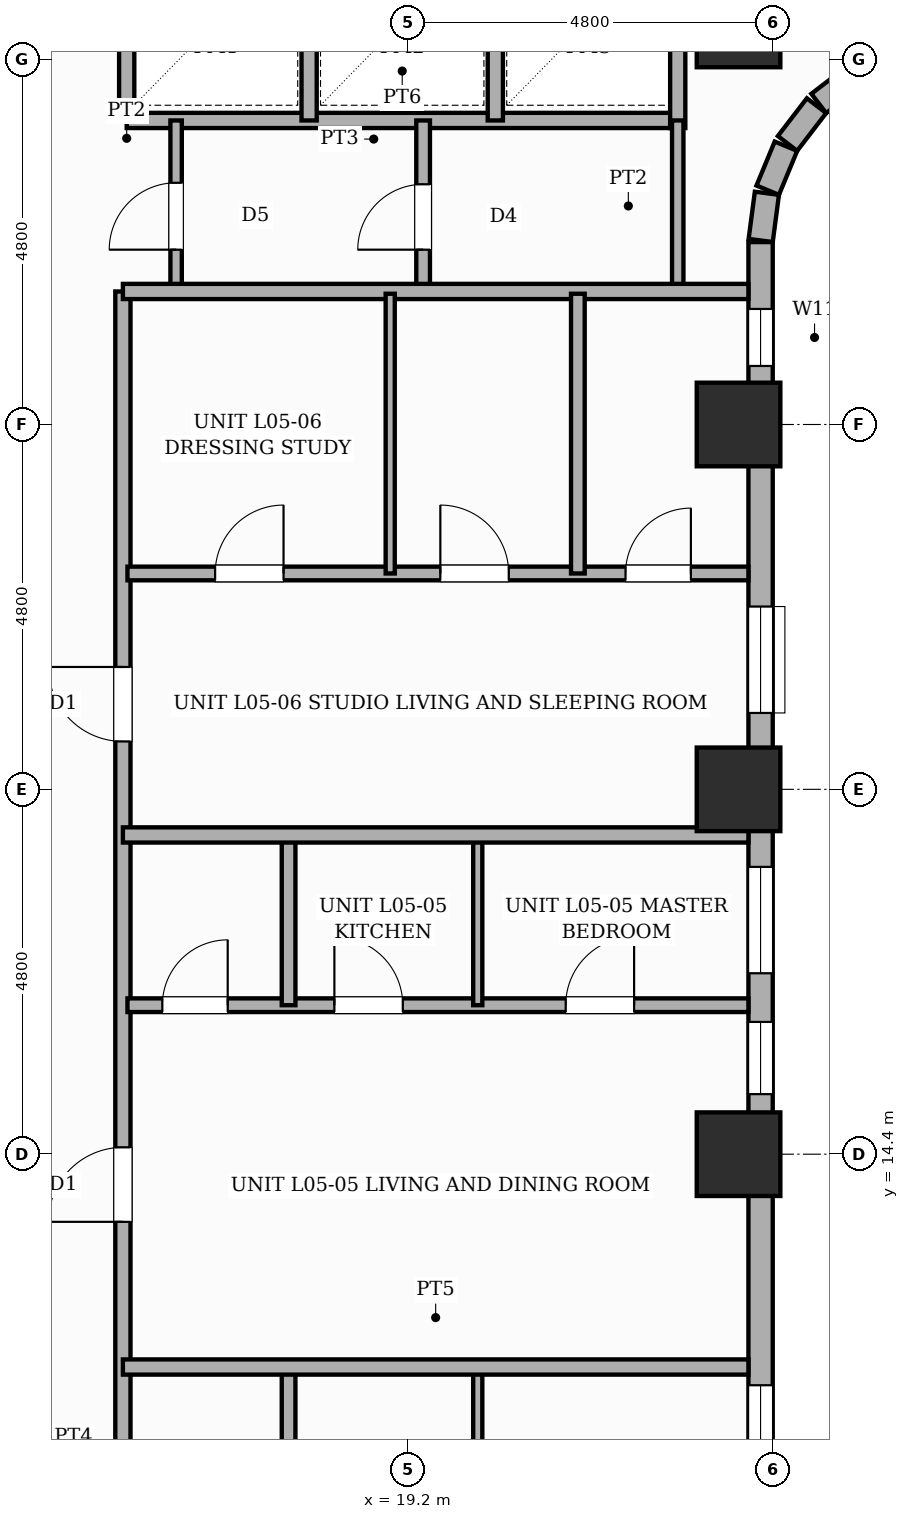
"""IFC4 building model, lengths in metres.
Left out: names, types, materials, properties, quantities, classifications, styles, units other than length and angle.
Written with IfcOpenShell. Run it as: python <this file> out.ifc"""

import sys

from ifc_helpers import new_model, si_unit, direction, frame, frame_2d, origin, origin_2d, place, context, subcontext, project, spatial, rectangle, extrude, element, fill, save


model = new_model("IFC4")
c1 = context("Model", 3, precision=1e-05, world=origin(), true_north=direction((0.0, 1.0)))
c2 = subcontext(c1, "Body", "Model", "MODEL_VIEW")
j1 = project(units=[si_unit("LENGTHUNIT", "METRE"), si_unit("PLANEANGLEUNIT", "RADIAN")], contexts=[c1])
p1 = place(None, origin())
s1 = spatial("IfcSite", under=j1, at=p1, CompositionType="ELEMENT")
p2 = place(p1, origin())
s2 = spatial("IfcBuilding", under=s1, at=p2, CompositionType="ELEMENT")
p3 = place(p2, frame((0.0, 0.0, 25.0)))
s3 = spatial("IfcBuildingStorey", under=s2, at=p3, CompositionType="ELEMENT", Elevation=25.0)
for number, where, z_axis, x_axis in (
    (1, (23.55, 14.4, 0.0), (0.0, 0.0, 1.0), (1.0, 0.0, 0.0)),
    (2, (23.55, 19.2, 0.0), (0.0, 0.0, 1.0), (1.0, 0.0, 0.0)),
    (3, (23.55, 24.0, 0.0), (0.0, 0.0, 1.0), (1.0, 0.0, 0.0)),
    (4, (23.55, 29.25, 0.0), (0.0, 0.0, 1.0), (1.0, 0.0, 0.0)),
):
    element("IfcColumn", number, at=place(p3, frame(where, z_axis=z_axis, x_axis=x_axis)), inside=s3, PredefinedType="COLUMN", context=c2, shape_type="SweptSolid", body=[
        extrude(rectangle(XDim=1.1, YDim=1.1, at=origin_2d()), origin(), (0.0, 0.0, 1.0), 3.6),
    ])
for number, where, z_axis, x_axis in (
    (5, (25.103, 28.605, 0.0), (0.0, 0.0, 1.0), (-0.793, -0.609, 0.0)),
    (6, (24.576, 28.195, 0.0), (0.0, 0.0, 1.0), (-0.609, -0.793, 0.0)),
):
    element("IfcWall", number, at=place(p3, frame(where, z_axis=z_axis, x_axis=x_axis)), inside=s3, PredefinedType="STANDARD", context=c2, shape_type="SweptSolid", body=[
        extrude(rectangle(XDim=0.626, YDim=0.32, at=frame_2d((0.313, 0.0))), origin(), (0.0, 0.0, 1.0), 3.35),
    ])
p4 = place(p3, frame((24.174, 27.661, 0.0), z_axis=(0.0, 0.0, 1.0), x_axis=(-0.382455093999, -0.923974080304, 0.0)))
e7 = element("IfcWall", 7, at=p4, inside=s3, PredefinedType="STANDARD", context=c2, shape_type="SweptSolid", body=[
    extrude(rectangle(XDim=0.626, YDim=0.32, at=frame_2d((0.313, 0.0))), origin(), (0.0, 0.0, 1.0), 3.35),
])
p5 = place(p3, frame((23.923, 27.042, 0.0), z_axis=(0.0, 0.0, 1.0), x_axis=(-0.130555323746, -0.9914410257, 0.0)))
e8 = element("IfcWall", 8, at=p5, inside=s3, PredefinedType="STANDARD", context=c2, shape_type="SweptSolid", body=[
    extrude(rectangle(XDim=0.626, YDim=0.32, at=frame_2d((0.313, 0.0))), origin(), (0.0, 0.0, 1.0), 2.53),
])
p6 = place(p3, frame((23.84, 26.4, 0.0), z_axis=(0.0, 0.0, 1.0), x_axis=(0.0, -1.0, 0.0)))
e9 = element("IfcWall", 9, at=p6, inside=s3, PredefinedType="STANDARD", context=c2, shape_type="SweptSolid", body=[
    extrude(rectangle(XDim=19.2, YDim=0.32, at=frame_2d((9.6, 0.0))), origin(), (0.0, 0.0, 1.0), 2.53),
])
p7 = place(p6, frame((15.04, 0.0, 0.45)))
e10 = element("IfcOpeningElement", 10, at=p7, cuts=e9, PredefinedType="OPENING", context=c2, shape_type="SweptSolid", body=[
    extrude(rectangle(XDim=0.95, YDim=1.8, at=frame_2d((0.475, 0.9))), frame((0.0, 0.17, 0.0), z_axis=(0.0, -1.0, 0.0), x_axis=(1.0, 0.0, 0.0)), (0.0, 0.0, 1.0), 0.34),
])
p8 = place(p6, frame((8.22, 0.0, 0.65)))
e11 = element("IfcOpeningElement", 11, at=p8, cuts=e9, PredefinedType="OPENING", context=c2, shape_type="SweptSolid", body=[
    extrude(rectangle(XDim=1.4, YDim=1.1, at=frame_2d((0.7, 0.55))), frame((0.0, 0.17, 0.0), z_axis=(0.0, -1.0, 0.0), x_axis=(1.0, 0.0, 0.0)), (0.0, 0.0, 1.0), 0.34),
])
p9 = place(p6, frame((4.795, 0.0, 0.65)))
e12 = element("IfcOpeningElement", 12, at=p9, cuts=e9, PredefinedType="OPENING", context=c2, shape_type="SweptSolid", body=[
    extrude(rectangle(XDim=1.4, YDim=1.1, at=frame_2d((0.7, 0.55))), frame((0.0, 0.17, 0.0), z_axis=(0.0, -1.0, 0.0), x_axis=(1.0, 0.0, 0.0)), (0.0, 0.0, 1.0), 0.34),
])
p10 = place(p6, frame((10.26, 0.0, 0.45)))
e13 = element("IfcOpeningElement", 13, at=p10, cuts=e9, PredefinedType="OPENING", context=c2, shape_type="SweptSolid", body=[
    extrude(rectangle(XDim=0.95, YDim=1.8, at=frame_2d((0.475, 0.9))), frame((0.0, 0.17, 0.0), z_axis=(0.0, -1.0, 0.0), x_axis=(1.0, 0.0, 0.0)), (0.0, 0.0, 1.0), 0.34),
])
p11 = place(p6, frame((0.88, 0.0, 0.45)))
e14 = element("IfcOpeningElement", 14, at=p11, cuts=e9, PredefinedType="OPENING", context=c2, shape_type="SweptSolid", body=[
    extrude(rectangle(XDim=0.75, YDim=1.8, at=frame_2d((0.375, 0.9))), frame((0.0, 0.17, 0.0), z_axis=(0.0, -1.0, 0.0), x_axis=(1.0, 0.0, 0.0)), (0.0, 0.0, 1.0), 0.34),
])
p12 = place(p3, frame((15.5, 28.0, 0.0), z_axis=(0.0, 0.0, 1.0), x_axis=(1.0, 0.0, 0.0)))
e15 = element("IfcWall", 15, at=p12, inside=s3, PredefinedType="POLYGONAL", context=c2, shape_type="SweptSolid", body=[
    extrude(rectangle(XDim=7.25, YDim=0.2, at=frame_2d((3.625, 0.0))), origin(), (0.0, 0.0, 1.0), 3.35),
])
p13 = place(p3, frame((22.75, 27.9, 0.0), z_axis=(0.0, 0.0, 1.0), x_axis=(0.0, 1.0, 0.0)))
e16 = element("IfcWall", 16, at=p13, inside=s3, PredefinedType="POLYGONAL", context=c2, shape_type="SweptSolid", body=[
    extrude(rectangle(XDim=3.0, YDim=0.2, at=frame_2d((1.5, 0.0))), origin(), (0.0, 0.0, 1.0), 3.35),
])
for number, where, z_axis, x_axis in (
    (17, (15.5, 28.0, 0.0), (0.0, 0.0, 1.0), (0.0, 1.0, 0.0)),
    (18, (17.9, 28.0, 0.0), (0.0, 0.0, 1.0), (0.0, 1.0, 0.0)),
    (19, (20.35, 28.0, 0.0), (0.0, 0.0, 1.0), (0.0, 1.0, 0.0)),
):
    element("IfcWall", number, at=place(p3, frame(where, z_axis=z_axis, x_axis=x_axis)), inside=s3, PredefinedType="POLYGONAL", context=c2, shape_type="SweptSolid", body=[
        extrude(rectangle(XDim=2.9, YDim=0.2, at=frame_2d((1.45, 0.0))), origin(), (0.0, 0.0, 1.0), 3.35),
    ])
p14 = place(p3, frame((16.15, 25.75, 0.0), z_axis=(0.0, 0.0, 1.0), x_axis=(0.0, 1.0, 0.0)))
e20 = element("IfcWall", 20, at=p14, inside=s3, PredefinedType="PARTITIONING", context=c2, shape_type="SweptSolid", body=[
    extrude(rectangle(XDim=2.25, YDim=0.15, at=frame_2d((1.125, 0.0))), origin(), (0.0, 0.0, 1.0), 3.35),
])
p15 = place(p14, frame((0.55, 0.0, 0.0)))
e21 = element("IfcOpeningElement", 21, at=p15, cuts=e20, PredefinedType="OPENING", context=c2, shape_type="SweptSolid", body=[
    extrude(rectangle(XDim=0.88, YDim=2.1, at=frame_2d((0.44, 1.05))), frame((0.0, 0.085, 0.0), z_axis=(0.0, -1.0, 0.0), x_axis=(1.0, 0.0, 0.0)), (0.0, 0.0, 1.0), 0.17),
])
p16 = place(p3, frame((22.75, 25.75, 0.0), z_axis=(0.0, 0.0, 1.0), x_axis=(0.0, 1.0, 0.0)))
e22 = element("IfcWall", 22, at=p16, inside=s3, PredefinedType="PARTITIONING", context=c2, shape_type="SweptSolid", body=[
    extrude(rectangle(XDim=2.25, YDim=0.15, at=frame_2d((1.125, 0.0))), origin(), (0.0, 0.0, 1.0), 3.35),
])
p17 = place(p3, frame((19.4, 25.75, 0.0), z_axis=(0.0, 0.0, 1.0), x_axis=(0.0, 1.0, 0.0)))
e23 = element("IfcWall", 23, at=p17, inside=s3, PredefinedType="PLUMBINGWALL", context=c2, shape_type="SweptSolid", body=[
    extrude(rectangle(XDim=2.25, YDim=0.18, at=frame_2d((1.125, 0.0))), origin(), (0.0, 0.0, 1.0), 3.35),
])
p18 = place(p17, frame((0.55, 0.0, 0.0)))
e24 = element("IfcOpeningElement", 24, at=p18, cuts=e23, PredefinedType="OPENING", context=c2, shape_type="SweptSolid", body=[
    extrude(rectangle(XDim=0.86, YDim=2.1, at=frame_2d((0.43, 1.05))), frame((0.0, 0.1, 0.0), z_axis=(0.0, -1.0, 0.0), x_axis=(1.0, 0.0, 0.0)), (0.0, 0.0, 1.0), 0.2),
])
p19 = place(p3, frame((15.45, 5.12, 0.0), z_axis=(0.0, 0.0, 1.0), x_axis=(0.0, 1.0, 0.0)))
e25 = element("IfcWall", 25, at=p19, inside=s3, PredefinedType="PARTITIONING", context=c2, shape_type="SweptSolid", body=[
    extrude(rectangle(XDim=20.63, YDim=0.2, at=frame_2d((10.315, 0.0))), origin(), (0.0, 0.0, 1.0), 3.35),
])
p20 = place(p19, frame((1.025, 0.0, 0.0)))
e26 = element("IfcOpeningElement", 26, at=p20, cuts=e25, PredefinedType="OPENING", context=c2, shape_type="SweptSolid", body=[
    extrude(rectangle(XDim=0.98, YDim=2.18, at=frame_2d((0.49, 1.09))), frame((0.0, 0.11, 0.0), z_axis=(0.0, -1.0, 0.0), x_axis=(1.0, 0.0, 0.0)), (0.0, 0.0, 1.0), 0.22),
])
p21 = place(p19, frame((8.39, 0.0, 0.0)))
e27 = element("IfcOpeningElement", 27, at=p21, cuts=e25, PredefinedType="OPENING", context=c2, shape_type="SweptSolid", body=[
    extrude(rectangle(XDim=0.98, YDim=2.18, at=frame_2d((0.49, 1.09))), frame((0.0, 0.11, 0.0), z_axis=(0.0, -1.0, 0.0), x_axis=(1.0, 0.0, 0.0)), (0.0, 0.0, 1.0), 0.22),
])
p22 = place(p19, frame((14.71, 0.0, 0.0)))
e28 = element("IfcOpeningElement", 28, at=p22, cuts=e25, PredefinedType="OPENING", context=c2, shape_type="SweptSolid", body=[
    extrude(rectangle(XDim=0.98, YDim=2.18, at=frame_2d((0.49, 1.09))), frame((0.0, 0.11, 0.0), z_axis=(0.0, -1.0, 0.0), x_axis=(1.0, 0.0, 0.0)), (0.0, 0.0, 1.0), 0.22),
])
p23 = place(p3, frame((15.45, 25.75, 0.0), z_axis=(0.0, 0.0, 1.0), x_axis=(1.0, 0.0, 0.0)))
e29 = element("IfcWall", 29, at=p23, inside=s3, PredefinedType="PARTITIONING", context=c2, shape_type="SweptSolid", body=[
    extrude(rectangle(XDim=8.23, YDim=0.2, at=frame_2d((4.115, 0.0))), origin(), (0.0, 0.0, 1.0), 3.35),
])
p24 = place(p3, frame((17.63, 7.59, 0.0), z_axis=(0.0, 0.0, 1.0), x_axis=(0.0, 1.0, 0.0)))
e30 = element("IfcWall", 30, at=p24, inside=s3, PredefinedType="PLUMBINGWALL", context=c2, shape_type="SweptSolid", body=[
    extrude(rectangle(XDim=4.05, YDim=0.18, at=frame_2d((2.025, 0.0))), origin(), (0.0, 0.0, 1.0), 3.35),
])
p25 = place(p3, frame((20.119, 7.59, 0.0), z_axis=(0.0, 0.0, 1.0), x_axis=(0.0, 1.0, 0.0)))
e31 = element("IfcWall", 31, at=p25, inside=s3, PredefinedType="PARTITIONING", context=c2, shape_type="SweptSolid", body=[
    extrude(rectangle(XDim=4.05, YDim=0.12, at=frame_2d((2.025, 0.0))), origin(), (0.0, 0.0, 1.0), 3.35),
])
p26 = place(p3, frame((15.45, 11.6, 0.0), z_axis=(0.0, 0.0, 1.0), x_axis=(1.0, 0.0, 0.0)))
e32 = element("IfcWall", 32, at=p26, inside=s3, PredefinedType="SOLIDWALL", context=c2, shape_type="SweptSolid", body=[
    extrude(rectangle(XDim=8.23, YDim=0.2, at=frame_2d((4.115, 0.0))), origin(), (0.0, 0.0, 1.0), 3.35),
])
p27 = place(p3, frame((15.51, 16.36, 0.0), z_axis=(0.0, 0.0, 1.0), x_axis=(1.0, 0.0, 0.0)))
e33 = element("IfcWall", 33, at=p27, inside=s3, PredefinedType="PLUMBINGWALL", context=c2, shape_type="SweptSolid", body=[
    extrude(rectangle(XDim=8.17, YDim=0.18, at=frame_2d((4.085, 0.0))), origin(), (0.0, 0.0, 1.0), 3.35),
])
p28 = place(p27, frame((0.459, 0.0, 0.0)))
e34 = element("IfcOpeningElement", 34, at=p28, cuts=e33, PredefinedType="OPENING", context=c2, shape_type="SweptSolid", body=[
    extrude(rectangle(XDim=0.86, YDim=2.1, at=frame_2d((0.43, 1.05))), frame((0.0, 0.1, 0.0), z_axis=(0.0, -1.0, 0.0), x_axis=(1.0, 0.0, 0.0)), (0.0, 0.0, 1.0), 0.2),
])
p29 = place(p27, frame((2.722, 0.0, 0.0)))
e35 = element("IfcOpeningElement", 35, at=p29, cuts=e33, PredefinedType="OPENING", context=c2, shape_type="SweptSolid", body=[
    extrude(rectangle(XDim=0.9, YDim=2.15, at=frame_2d((0.45, 1.075))), frame((0.0, 0.1, 0.0), z_axis=(0.0, -1.0, 0.0), x_axis=(1.0, 0.0, 0.0)), (0.0, 0.0, 1.0), 0.2),
])
p30 = place(p27, frame((5.766, 0.0, 0.0)))
e36 = element("IfcOpeningElement", 36, at=p30, cuts=e33, PredefinedType="OPENING", context=c2, shape_type="SweptSolid", body=[
    extrude(rectangle(XDim=0.9, YDim=2.15, at=frame_2d((0.45, 1.075))), frame((0.0, 0.1, 0.0), z_axis=(0.0, -1.0, 0.0), x_axis=(1.0, 0.0, 0.0)), (0.0, 0.0, 1.0), 0.2),
])
p31 = place(p3, frame((17.63, 16.36, 0.0), z_axis=(0.0, 0.0, 1.0), x_axis=(0.0, 1.0, 0.0)))
e37 = element("IfcWall", 37, at=p31, inside=s3, PredefinedType="PLUMBINGWALL", context=c2, shape_type="SweptSolid", body=[
    extrude(rectangle(XDim=2.28, YDim=0.18, at=frame_2d((1.14, 0.0))), origin(), (0.0, 0.0, 1.0), 3.35),
])
p32 = place(p3, frame((20.119, 16.36, 0.0), z_axis=(0.0, 0.0, 1.0), x_axis=(0.0, 1.0, 0.0)))
e38 = element("IfcWall", 38, at=p32, inside=s3, PredefinedType="PARTITIONING", context=c2, shape_type="SweptSolid", body=[
    extrude(rectangle(XDim=2.28, YDim=0.12, at=frame_2d((1.14, 0.0))), origin(), (0.0, 0.0, 1.0), 3.35),
])
p33 = place(p3, frame((15.45, 18.6, 0.0), z_axis=(0.0, 0.0, 1.0), x_axis=(1.0, 0.0, 0.0)))
e39 = element("IfcWall", 39, at=p33, inside=s3, PredefinedType="SOLIDWALL", context=c2, shape_type="SweptSolid", body=[
    extrude(rectangle(XDim=8.23, YDim=0.2, at=frame_2d((4.115, 0.0))), origin(), (0.0, 0.0, 1.0), 3.35),
])
p34 = place(p3, frame((15.51, 22.04, 0.0), z_axis=(0.0, 0.0, 1.0), x_axis=(1.0, 0.0, 0.0)))
e40 = element("IfcWall", 40, at=p34, inside=s3, PredefinedType="PLUMBINGWALL", context=c2, shape_type="SweptSolid", body=[
    extrude(rectangle(XDim=8.17, YDim=0.18, at=frame_2d((4.085, 0.0))), origin(), (0.0, 0.0, 1.0), 3.35),
])
p35 = place(p34, frame((1.154, 0.0, 0.0)))
e41 = element("IfcOpeningElement", 41, at=p35, cuts=e40, PredefinedType="OPENING", context=c2, shape_type="SweptSolid", body=[
    extrude(rectangle(XDim=0.9, YDim=2.15, at=frame_2d((0.45, 1.075))), frame((0.0, 0.1, 0.0), z_axis=(0.0, -1.0, 0.0), x_axis=(1.0, 0.0, 0.0)), (0.0, 0.0, 1.0), 0.2),
])
p36 = place(p34, frame((4.116, 0.0, 0.0)))
e42 = element("IfcOpeningElement", 42, at=p36, cuts=e40, PredefinedType="OPENING", context=c2, shape_type="SweptSolid", body=[
    extrude(rectangle(XDim=0.9, YDim=2.15, at=frame_2d((0.45, 1.075))), frame((0.0, 0.1, 0.0), z_axis=(0.0, -1.0, 0.0), x_axis=(1.0, 0.0, 0.0)), (0.0, 0.0, 1.0), 0.2),
])
p37 = place(p34, frame((6.553, 0.0, 0.0)))
e43 = element("IfcOpeningElement", 43, at=p37, cuts=e40, PredefinedType="OPENING", context=c2, shape_type="SweptSolid", body=[
    extrude(rectangle(XDim=0.86, YDim=2.1, at=frame_2d((0.43, 1.05))), frame((0.0, 0.1, 0.0), z_axis=(0.0, -1.0, 0.0), x_axis=(1.0, 0.0, 0.0)), (0.0, 0.0, 1.0), 0.2),
])
p38 = place(p3, frame((18.967, 22.04, 0.0), z_axis=(0.0, 0.0, 1.0), x_axis=(0.0, 1.0, 0.0)))
e44 = element("IfcWall", 44, at=p38, inside=s3, PredefinedType="PARTITIONING", context=c2, shape_type="SweptSolid", body=[
    extrude(rectangle(XDim=3.68, YDim=0.12, at=frame_2d((1.84, 0.0))), origin(), (0.0, 0.0, 1.0), 3.35),
])
p39 = place(p3, frame((21.436, 22.04, 0.0), z_axis=(0.0, 0.0, 1.0), x_axis=(0.0, 1.0, 0.0)))
e45 = element("IfcWall", 45, at=p39, inside=s3, PredefinedType="PLUMBINGWALL", context=c2, shape_type="SweptSolid", body=[
    extrude(rectangle(XDim=3.68, YDim=0.18, at=frame_2d((1.84, 0.0))), origin(), (0.0, 0.0, 1.0), 3.35),
])
p40 = place(p7, origin())
e46 = element("IfcWindow", 46, at=p40, inside=s3, PartitioningType="SINGLE_PANEL", PredefinedType="WINDOW", context=c2, shape_type="SweptSolid", body=[
    extrude(rectangle(XDim=0.95, YDim=1.8, at=frame_2d((0.475, 0.9))), frame((0.0, 0.03, 0.0), z_axis=(0.0, -1.0, 0.0), x_axis=(1.0, 0.0, 0.0)), (0.0, 0.0, 1.0), 0.06),
])
fill(e10, e46)
p41 = place(p8, origin())
e47 = element("IfcWindow", 47, at=p41, inside=s3, PartitioningType="SINGLE_PANEL", PredefinedType="WINDOW", context=c2, shape_type="SweptSolid", body=[
    extrude(rectangle(XDim=1.4, YDim=1.1, at=frame_2d((0.7, 0.55))), frame((0.0, 0.03, 0.0), z_axis=(0.0, -1.0, 0.0), x_axis=(1.0, 0.0, 0.0)), (0.0, 0.0, 1.0), 0.06),
])
fill(e11, e47)
p42 = place(p9, origin())
e48 = element("IfcWindow", 48, at=p42, inside=s3, PartitioningType="SINGLE_PANEL", PredefinedType="WINDOW", context=c2, shape_type="SweptSolid", body=[
    extrude(rectangle(XDim=1.4, YDim=1.1, at=frame_2d((0.7, 0.55))), frame((0.0, 0.03, 0.0), z_axis=(0.0, -1.0, 0.0), x_axis=(1.0, 0.0, 0.0)), (0.0, 0.0, 1.0), 0.06),
])
fill(e12, e48)
p43 = place(p10, origin())
e49 = element("IfcWindow", 49, at=p43, inside=s3, PartitioningType="SINGLE_PANEL", PredefinedType="WINDOW", context=c2, shape_type="SweptSolid", body=[
    extrude(rectangle(XDim=0.95, YDim=1.8, at=frame_2d((0.475, 0.9))), frame((0.0, 0.03, 0.0), z_axis=(0.0, -1.0, 0.0), x_axis=(1.0, 0.0, 0.0)), (0.0, 0.0, 1.0), 0.06),
])
fill(e13, e49)
p44 = place(p11, origin())
e50 = element("IfcWindow", 50, at=p44, inside=s3, PartitioningType="SINGLE_PANEL", PredefinedType="WINDOW", context=c2, shape_type="SweptSolid", body=[
    extrude(rectangle(XDim=0.75, YDim=1.8, at=frame_2d((0.375, 0.9))), frame((0.0, 0.03, 0.0), z_axis=(0.0, -1.0, 0.0), x_axis=(1.0, 0.0, 0.0)), (0.0, 0.0, 1.0), 0.06),
])
fill(e14, e50)
p45 = place(p15, origin())
e51 = element("IfcDoor", 51, at=p45, inside=s3, OperationType="SINGLE_SWING_LEFT", PredefinedType="DOOR", context=c2, shape_type="SweptSolid", body=[
    extrude(rectangle(XDim=0.88, YDim=2.1, at=frame_2d((0.44, 1.05))), frame((0.0, 0.025, 0.0), z_axis=(0.0, -1.0, 0.0), x_axis=(1.0, 0.0, 0.0)), (0.0, 0.0, 1.0), 0.05),
])
fill(e21, e51)
p46 = place(p18, origin())
e52 = element("IfcDoor", 52, at=p46, inside=s3, OperationType="SINGLE_SWING_LEFT", PredefinedType="DOOR", context=c2, shape_type="SweptSolid", body=[
    extrude(rectangle(XDim=0.86, YDim=2.1, at=frame_2d((0.43, 1.05))), frame((0.0, 0.025, 0.0), z_axis=(0.0, -1.0, 0.0), x_axis=(1.0, 0.0, 0.0)), (0.0, 0.0, 1.0), 0.05),
])
fill(e24, e52)
p47 = place(p21, origin())
e53 = element("IfcDoor", 53, at=p47, inside=s3, OperationType="SINGLE_SWING_LEFT", PredefinedType="DOOR", context=c2, shape_type="SweptSolid", body=[
    extrude(rectangle(XDim=0.98, YDim=2.18, at=frame_2d((0.49, 1.09))), frame((0.0, 0.025, 0.0), z_axis=(0.0, -1.0, 0.0), x_axis=(1.0, 0.0, 0.0)), (0.0, 0.0, 1.0), 0.05),
])
fill(e27, e53)
p48 = place(p28, origin())
e54 = element("IfcDoor", 54, at=p48, inside=s3, OperationType="SINGLE_SWING_RIGHT", PredefinedType="DOOR", context=c2, shape_type="SweptSolid", body=[
    extrude(rectangle(XDim=0.86, YDim=2.1, at=frame_2d((0.43, 1.05))), frame((0.0, 0.025, 0.0), z_axis=(0.0, -1.0, 0.0), x_axis=(1.0, 0.0, 0.0)), (0.0, 0.0, 1.0), 0.05),
])
fill(e34, e54)
p49 = place(p29, origin())
e55 = element("IfcDoor", 55, at=p49, inside=s3, OperationType="SINGLE_SWING_LEFT", PredefinedType="DOOR", context=c2, shape_type="SweptSolid", body=[
    extrude(rectangle(XDim=0.9, YDim=2.15, at=frame_2d((0.45, 1.075))), frame((0.0, 0.025, 0.0), z_axis=(0.0, -1.0, 0.0), x_axis=(1.0, 0.0, 0.0)), (0.0, 0.0, 1.0), 0.05),
])
fill(e35, e55)
p50 = place(p30, origin())
e56 = element("IfcDoor", 56, at=p50, inside=s3, OperationType="SINGLE_SWING_RIGHT", PredefinedType="DOOR", context=c2, shape_type="SweptSolid", body=[
    extrude(rectangle(XDim=0.9, YDim=2.15, at=frame_2d((0.45, 1.075))), frame((0.0, 0.025, 0.0), z_axis=(0.0, -1.0, 0.0), x_axis=(1.0, 0.0, 0.0)), (0.0, 0.0, 1.0), 0.05),
])
fill(e36, e56)
p51 = place(p22, origin())
e57 = element("IfcDoor", 57, at=p51, inside=s3, OperationType="SINGLE_SWING_RIGHT", PredefinedType="DOOR", context=c2, shape_type="SweptSolid", body=[
    extrude(rectangle(XDim=0.98, YDim=2.18, at=frame_2d((0.49, 1.09))), frame((0.0, 0.025, 0.0), z_axis=(0.0, -1.0, 0.0), x_axis=(1.0, 0.0, 0.0)), (0.0, 0.0, 1.0), 0.05),
])
fill(e28, e57)
p52 = place(p35, origin())
e58 = element("IfcDoor", 58, at=p52, inside=s3, OperationType="SINGLE_SWING_RIGHT", PredefinedType="DOOR", context=c2, shape_type="SweptSolid", body=[
    extrude(rectangle(XDim=0.9, YDim=2.15, at=frame_2d((0.45, 1.075))), frame((0.0, 0.025, 0.0), z_axis=(0.0, -1.0, 0.0), x_axis=(1.0, 0.0, 0.0)), (0.0, 0.0, 1.0), 0.05),
])
fill(e41, e58)
p53 = place(p36, origin())
e59 = element("IfcDoor", 59, at=p53, inside=s3, OperationType="SINGLE_SWING_LEFT", PredefinedType="DOOR", context=c2, shape_type="SweptSolid", body=[
    extrude(rectangle(XDim=0.9, YDim=2.15, at=frame_2d((0.45, 1.075))), frame((0.0, 0.025, 0.0), z_axis=(0.0, -1.0, 0.0), x_axis=(1.0, 0.0, 0.0)), (0.0, 0.0, 1.0), 0.05),
])
fill(e42, e59)
p54 = place(p37, origin())
e60 = element("IfcDoor", 60, at=p54, inside=s3, OperationType="SINGLE_SWING_RIGHT", PredefinedType="DOOR", context=c2, shape_type="SweptSolid", body=[
    extrude(rectangle(XDim=0.86, YDim=2.1, at=frame_2d((0.43, 1.05))), frame((0.0, 0.025, 0.0), z_axis=(0.0, -1.0, 0.0), x_axis=(1.0, 0.0, 0.0)), (0.0, 0.0, 1.0), 0.05),
])
fill(e43, e60)
save(model, sys.argv[1])
